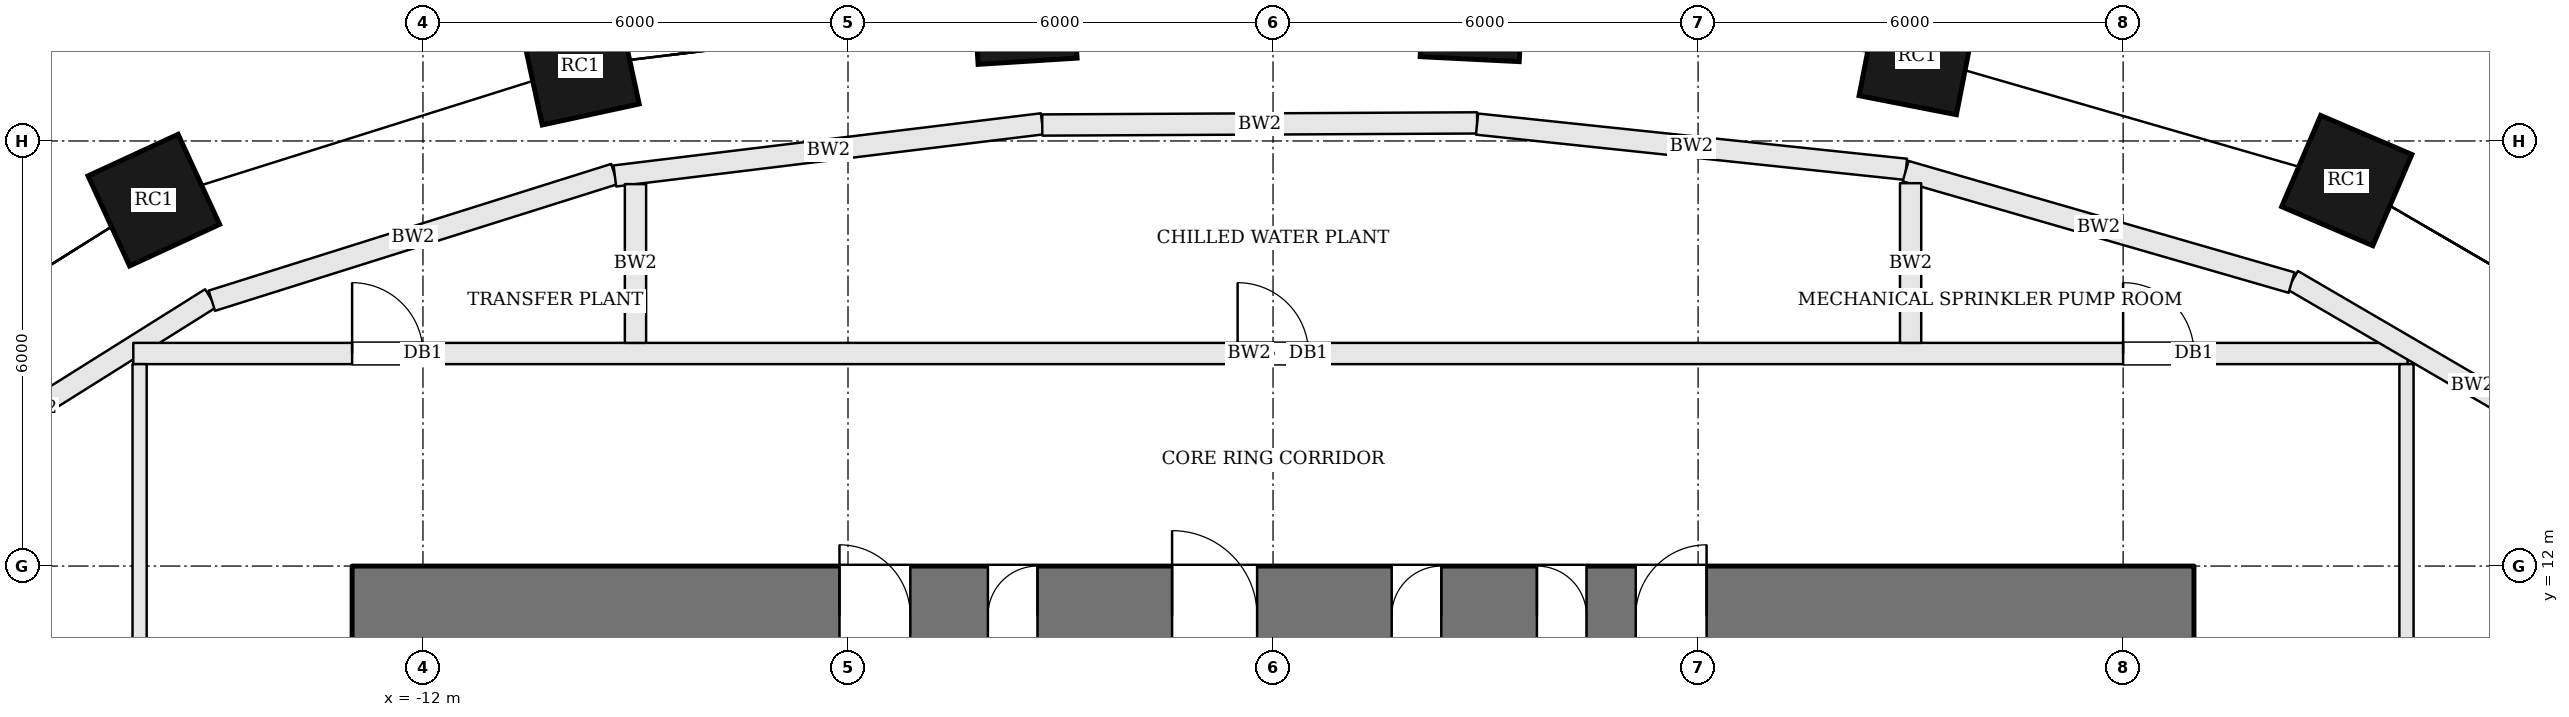
"""IFC4 building model, lengths in metres.
Left out: names, types, materials, properties, quantities, classifications, styles, units other than length and angle.
Written with IfcOpenShell. Run it as: python <this file> out.ifc"""

import sys

from ifc_helpers import new_model, si_unit, direction, frame, frame_2d, origin, origin_2d, place, context, subcontext, project, spatial, rectangle, extrude, element, fill, save


model = new_model("IFC4")
c1 = context("Model", 3, precision=1e-05, world=origin(), true_north=direction((0.0, 1.0)))
c2 = subcontext(c1, "Body", "Model", "MODEL_VIEW")
j1 = project(units=[si_unit("LENGTHUNIT", "METRE"), si_unit("PLANEANGLEUNIT", "RADIAN")], contexts=[c1])
p1 = place(None, origin())
s1 = spatial("IfcSite", under=j1, at=p1, CompositionType="ELEMENT")
p2 = place(p1, origin())
s2 = spatial("IfcBuilding", under=s1, at=p2, CompositionType="ELEMENT")
p3 = place(p2, frame((0.0, 0.0, 33.0)))
s3 = spatial("IfcBuildingStorey", under=s2, at=p3, CompositionType="ELEMENT", Elevation=33.0)
p4 = place(p3, frame((-13.0, 11.3, 0.0), z_axis=(0.0, 0.0, 1.0), x_axis=(1.0, 0.0, 0.0)))
e1 = element("IfcWall", 1, at=p4, inside=s3, PredefinedType="SHEAR", context=c2, shape_type="SweptSolid", body=[
    extrude(rectangle(XDim=26.0, YDim=1.4, at=frame_2d((13.0, 0.0))), origin(), (0.0, 0.0, 1.0), 4.5),
])
p5 = place(p4, frame((8.975, 0.0, 0.0)))
e2 = element("IfcOpeningElement", 2, at=p5, cuts=e1, PredefinedType="OPENING", context=c2, shape_type="SweptSolid", body=[
    extrude(rectangle(XDim=0.7, YDim=2.1, at=frame_2d((0.35, 1.05))), frame((0.0, 0.71, 0.0), z_axis=(0.0, -1.0, 0.0), x_axis=(1.0, 0.0, 0.0)), (0.0, 0.0, 1.0), 1.42),
])
p6 = place(p4, frame((11.575, 0.0, 0.0)))
e3 = element("IfcOpeningElement", 3, at=p6, cuts=e1, PredefinedType="OPENING", context=c2, shape_type="SweptSolid", body=[
    extrude(rectangle(XDim=1.2, YDim=2.1, at=frame_2d((0.6, 1.05))), frame((0.0, 0.71, 0.0), z_axis=(0.0, -1.0, 0.0), x_axis=(1.0, 0.0, 0.0)), (0.0, 0.0, 1.0), 1.42),
])
p7 = place(p4, frame((14.675, 0.0, 0.0)))
e4 = element("IfcOpeningElement", 4, at=p7, cuts=e1, PredefinedType="OPENING", context=c2, shape_type="SweptSolid", body=[
    extrude(rectangle(XDim=0.7, YDim=2.1, at=frame_2d((0.35, 1.05))), frame((0.0, 0.71, 0.0), z_axis=(0.0, -1.0, 0.0), x_axis=(1.0, 0.0, 0.0)), (0.0, 0.0, 1.0), 1.42),
])
p8 = place(p4, frame((16.725, 0.0, 0.0)))
e5 = element("IfcOpeningElement", 5, at=p8, cuts=e1, PredefinedType="OPENING", context=c2, shape_type="SweptSolid", body=[
    extrude(rectangle(XDim=0.7, YDim=2.1, at=frame_2d((0.35, 1.05))), frame((0.0, 0.71, 0.0), z_axis=(0.0, -1.0, 0.0), x_axis=(1.0, 0.0, 0.0)), (0.0, 0.0, 1.0), 1.42),
])
p9 = place(p4, frame((6.88, 0.0, 0.0)))
e6 = element("IfcOpeningElement", 6, at=p9, cuts=e1, PredefinedType="OPENING", context=c2, shape_type="SweptSolid", body=[
    extrude(rectangle(XDim=1.0, YDim=2.1, at=frame_2d((0.5, 1.05))), frame((0.0, 0.71, 0.0), z_axis=(0.0, -1.0, 0.0), x_axis=(1.0, 0.0, 0.0)), (0.0, 0.0, 1.0), 1.42),
])
p10 = place(p4, frame((18.12, 0.0, 0.0)))
e7 = element("IfcOpeningElement", 7, at=p10, cuts=e1, PredefinedType="OPENING", context=c2, shape_type="SweptSolid", body=[
    extrude(rectangle(XDim=1.0, YDim=2.1, at=frame_2d((0.5, 1.05))), frame((0.0, 0.71, 0.0), z_axis=(0.0, -1.0, 0.0), x_axis=(1.0, 0.0, 0.0)), (0.0, 0.0, 1.0), 1.42),
])
for number, where, z_axis, x_axis in (
    (8, (15.157, 17.441, 0.0), (0.0, 0.0, 1.0), (-0.919, 0.394, 0.0)),
    (9, (9.094, 19.192, 0.0), (0.0, 0.0, 1.0), (-0.981, 0.192, 0.0)),
    (10, (2.811, 19.854, 0.0), (0.0, 0.0, 1.0), (-0.999, 0.05, 0.0)),
    (11, (-3.509, 19.824, 0.0), (0.0, 0.0, 1.0), (-0.998, -0.063, 0.0)),
    (12, (-9.78, 19.058, 0.0), (0.0, 0.0, 1.0), (-0.977, -0.211, 0.0)),
    (13, (-15.799, 17.165, 0.0), (0.0, 0.0, 1.0), (-0.908, -0.419, 0.0)),
):
    element("IfcColumn", number, at=place(p3, frame(where, z_axis=z_axis, x_axis=x_axis)), inside=s3, PredefinedType="COLUMN", context=c2, shape_type="SweptSolid", body=[
        extrude(rectangle(XDim=1.4, YDim=1.4, at=origin_2d()), origin(), (0.0, 0.0, 1.0), 4.5),
    ])
p11 = place(p3, frame((18.934, 18.821, 0.0), z_axis=(0.0, 0.0, 1.0), x_axis=(-0.912571415594, 0.408917365052, 0.0)))
e14 = element("IfcWall", 14, at=p11, inside=s3, PredefinedType="SOLIDWALL", context=c2, shape_type="SweptSolid", body=[
    extrude(rectangle(XDim=4.301, YDim=0.45, at=frame_2d((2.15, 0.0))), origin(), (0.0, 0.0, 1.0), 4.3),
])
p12 = place(p11, frame((1.101, 0.0, 1.2)))
e15 = element("IfcOpeningElement", 15, at=p12, cuts=e14, PredefinedType="OPENING", context=c2, shape_type="SweptSolid", body=[
    extrude(rectangle(XDim=2.1, YDim=1.8, at=frame_2d((1.05, 0.9))), frame((0.0, 0.235, 0.0), z_axis=(0.0, -1.0, 0.0), x_axis=(1.0, 0.0, 0.0)), (0.0, 0.0, 1.0), 0.47),
])
p13 = place(p3, frame((-15.009, 20.58, 0.0), z_axis=(0.0, 0.0, 1.0), x_axis=(-0.912571415594, -0.408917365052, 0.0)))
e16 = element("IfcWall", 16, at=p13, inside=s3, PredefinedType="SOLIDWALL", context=c2, shape_type="SweptSolid", body=[
    extrude(rectangle(XDim=4.301, YDim=0.45, at=frame_2d((2.15, 0.0))), origin(), (0.0, 0.0, 1.0), 4.3),
])
p14 = place(p13, frame((1.101, 0.0, 1.2)))
e17 = element("IfcOpeningElement", 17, at=p14, cuts=e16, PredefinedType="OPENING", context=c2, shape_type="SweptSolid", body=[
    extrude(rectangle(XDim=2.1, YDim=1.8, at=frame_2d((1.05, 0.9))), frame((0.0, 0.235, 0.0), z_axis=(0.0, -1.0, 0.0), x_axis=(1.0, 0.0, 0.0)), (0.0, 0.0, 1.0), 0.47),
])
p15 = place(p3, frame((-19.962, 12.664, 0.0), z_axis=(0.0, 0.0, 1.0), x_axis=(0.847051762776, 0.531510405522, 0.0)))
e18 = element("IfcWall", 18, at=p15, inside=s3, PredefinedType="SOLIDWALL", context=c2, shape_type="SweptSolid", body=[
    extrude(rectangle(XDim=5.863, YDim=0.3, at=frame_2d((2.931, 0.0))), origin(), (0.0, 0.0, 1.0), 4.3),
])
p16 = place(p3, frame((-16.089, 15.0, 0.0), z_axis=(0.0, 0.0, 1.0), x_axis=(1.0, 0.0, 0.0)))
e19 = element("IfcWall", 19, at=p16, inside=s3, PredefinedType="SOLIDWALL", context=c2, shape_type="SweptSolid", body=[
    extrude(rectangle(XDim=32.105, YDim=0.3, at=frame_2d((16.053, 0.0))), origin(), (0.0, 0.0, 1.0), 4.3),
])
p17 = place(p16, frame((3.089, 0.0, 0.0)))
e20 = element("IfcOpeningElement", 20, at=p17, cuts=e19, PredefinedType="OPENING", context=c2, shape_type="SweptSolid", body=[
    extrude(rectangle(XDim=1.0, YDim=2.1, at=frame_2d((0.5, 1.05))), frame((0.0, 0.16, 0.0), z_axis=(0.0, -1.0, 0.0), x_axis=(1.0, 0.0, 0.0)), (0.0, 0.0, 1.0), 0.32),
])
p18 = place(p16, frame((15.589, 0.0, 0.0)))
e21 = element("IfcOpeningElement", 21, at=p18, cuts=e19, PredefinedType="OPENING", context=c2, shape_type="SweptSolid", body=[
    extrude(rectangle(XDim=1.0, YDim=2.1, at=frame_2d((0.5, 1.05))), frame((0.0, 0.16, 0.0), z_axis=(0.0, -1.0, 0.0), x_axis=(1.0, 0.0, 0.0)), (0.0, 0.0, 1.0), 0.32),
])
p19 = place(p16, frame((28.089, 0.0, 0.0)))
e22 = element("IfcOpeningElement", 22, at=p19, cuts=e19, PredefinedType="OPENING", context=c2, shape_type="SweptSolid", body=[
    extrude(rectangle(XDim=1.0, YDim=2.1, at=frame_2d((0.5, 1.05))), frame((0.0, 0.16, 0.0), z_axis=(0.0, -1.0, 0.0), x_axis=(1.0, 0.0, 0.0)), (0.0, 0.0, 1.0), 0.32),
])
p20 = place(p3, frame((-16.0, 14.85, 0.0), z_axis=(0.0, 0.0, 1.0), x_axis=(0.0, -1.0, 0.0)))
e23 = element("IfcWall", 23, at=p20, inside=s3, PredefinedType="PARTITIONING", context=c2, shape_type="SweptSolid", body=[
    extrude(rectangle(XDim=20.95, YDim=0.2, at=frame_2d((10.475, 0.0))), origin(), (0.0, 0.0, 1.0), 4.3),
])
p21 = place(p20, frame((9.45, 0.0, 0.0)))
e24 = element("IfcOpeningElement", 24, at=p21, cuts=e23, PredefinedType="OPENING", context=c2, shape_type="SweptSolid", body=[
    extrude(rectangle(XDim=1.8, YDim=2.1, at=frame_2d((0.9, 1.05))), frame((0.0, 0.11, 0.0), z_axis=(0.0, -1.0, 0.0), x_axis=(1.0, 0.0, 0.0)), (0.0, 0.0, 1.0), 0.22),
])
p22 = place(p3, frame((16.0, -5.9, 0.0), z_axis=(0.0, 0.0, 1.0), x_axis=(0.0, 1.0, 0.0)))
e25 = element("IfcWall", 25, at=p22, inside=s3, PredefinedType="PARTITIONING", context=c2, shape_type="SweptSolid", body=[
    extrude(rectangle(XDim=20.75, YDim=0.2, at=frame_2d((10.375, 0.0))), origin(), (0.0, 0.0, 1.0), 4.3),
])
p23 = place(p22, frame((9.5, 0.0, 0.0)))
e26 = element("IfcOpeningElement", 26, at=p23, cuts=e25, PredefinedType="OPENING", context=c2, shape_type="SweptSolid", body=[
    extrude(rectangle(XDim=1.8, YDim=2.1, at=frame_2d((0.9, 1.05))), frame((0.0, 0.11, 0.0), z_axis=(0.0, -1.0, 0.0), x_axis=(1.0, 0.0, 0.0)), (0.0, 0.0, 1.0), 0.22),
])
p24 = place(p3, frame((14.392, 16.035, 0.0), z_axis=(0.0, 0.0, 1.0), x_axis=(0.863774384703, -0.503878767493, 0.0)))
e27 = element("IfcWall", 27, at=p24, inside=s3, PredefinedType="SOLIDWALL", context=c2, shape_type="SweptSolid", body=[
    extrude(rectangle(XDim=5.882, YDim=0.3, at=frame_2d((2.941, 0.0))), origin(), (0.0, 0.0, 1.0), 4.3),
])
p25 = place(p3, frame((-14.98, 15.745, 0.0), z_axis=(0.0, 0.0, 1.0), x_axis=(0.953907270772, 0.300101514107, 0.0)))
e28 = element("IfcWall", 28, at=p25, inside=s3, PredefinedType="SOLIDWALL", context=c2, shape_type="SweptSolid", body=[
    extrude(rectangle(XDim=5.958, YDim=0.3, at=frame_2d((2.979, 0.0))), origin(), (0.0, 0.0, 1.0), 4.3),
])
p26 = place(p3, frame((-9.291, 17.506, 0.0), z_axis=(0.0, 0.0, 1.0), x_axis=(0.992641284561, 0.12109203188, 0.0)))
e29 = element("IfcWall", 29, at=p26, inside=s3, PredefinedType="SOLIDWALL", context=c2, shape_type="SweptSolid", body=[
    extrude(rectangle(XDim=6.077, YDim=0.3, at=frame_2d((3.038, 0.0))), origin(), (0.0, 0.0, 1.0), 4.3),
])
p27 = place(p3, frame((-9.0, 17.391, 0.0), z_axis=(0.0, 0.0, 1.0), x_axis=(0.0, -1.0, 0.0)))
e30 = element("IfcWall", 30, at=p27, inside=s3, PredefinedType="SOLIDWALL", context=c2, shape_type="SweptSolid", body=[
    extrude(rectangle(XDim=2.241, YDim=0.3, at=frame_2d((1.121, 0.0))), origin(), (0.0, 0.0, 1.0), 4.3),
])
p28 = place(p3, frame((-3.258, 18.225, 0.0), z_axis=(0.0, 0.0, 1.0), x_axis=(0.999988230875, 0.004851609169, 0.0)))
e31 = element("IfcWall", 31, at=p28, inside=s3, PredefinedType="SOLIDWALL", context=c2, shape_type="SweptSolid", body=[
    extrude(rectangle(XDim=6.139, YDim=0.3, at=frame_2d((3.07, 0.0))), origin(), (0.0, 0.0, 1.0), 4.3),
])
p29 = place(p3, frame((2.88, 18.238, 0.0), z_axis=(0.0, 0.0, 1.0), x_axis=(0.994496001262, -0.10477453638, 0.0)))
e32 = element("IfcWall", 32, at=p29, inside=s3, PredefinedType="SOLIDWALL", context=c2, shape_type="SweptSolid", body=[
    extrude(rectangle(XDim=6.089, YDim=0.3, at=frame_2d((3.044, 0.0))), origin(), (0.0, 0.0, 1.0), 4.3),
])
p30 = place(p3, frame((8.93, 17.574, 0.0), z_axis=(0.0, 0.0, 1.0), x_axis=(0.960754989582, -0.277398359752, 0.0)))
e33 = element("IfcWall", 33, at=p30, inside=s3, PredefinedType="SOLIDWALL", context=c2, shape_type="SweptSolid", body=[
    extrude(rectangle(XDim=5.671, YDim=0.3, at=frame_2d((2.835, 0.0))), origin(), (0.0, 0.0, 1.0), 4.3),
])
p31 = place(p3, frame((9.0, 17.404, 0.0), z_axis=(0.0, 0.0, 1.0), x_axis=(0.0, -1.0, 0.0)))
e34 = element("IfcWall", 34, at=p31, inside=s3, PredefinedType="SOLIDWALL", context=c2, shape_type="SweptSolid", body=[
    extrude(rectangle(XDim=2.254, YDim=0.3, at=frame_2d((1.127, 0.0))), origin(), (0.0, 0.0, 1.0), 4.3),
])
p32 = place(p12, origin())
e35 = element("IfcWindow", 35, at=p32, inside=s3, PartitioningType="SINGLE_PANEL", PredefinedType="WINDOW", context=c2, shape_type="SweptSolid", body=[
    extrude(rectangle(XDim=2.1, YDim=1.8, at=frame_2d((1.05, 0.9))), frame((0.0, 0.135, 0.0), z_axis=(0.0, -1.0, 0.0), x_axis=(1.0, 0.0, 0.0)), (0.0, 0.0, 1.0), 0.06),
])
fill(e15, e35)
p33 = place(p14, origin())
e36 = element("IfcWindow", 36, at=p33, inside=s3, PartitioningType="SINGLE_PANEL", PredefinedType="WINDOW", context=c2, shape_type="SweptSolid", body=[
    extrude(rectangle(XDim=2.1, YDim=1.8, at=frame_2d((1.05, 0.9))), frame((0.0, 0.135, 0.0), z_axis=(0.0, -1.0, 0.0), x_axis=(1.0, 0.0, 0.0)), (0.0, 0.0, 1.0), 0.06),
])
fill(e17, e36)
p34 = place(p5, origin())
e37 = element("IfcDoor", 37, at=p34, inside=s3, OperationType="SINGLE_SWING_RIGHT", PredefinedType="DOOR", context=c2, shape_type="SweptSolid", body=[
    extrude(rectangle(XDim=0.7, YDim=2.1, at=frame_2d((0.35, 1.05))), frame((0.0, 0.025, 0.0), z_axis=(0.0, -1.0, 0.0), x_axis=(1.0, 0.0, 0.0)), (0.0, 0.0, 1.0), 0.05),
])
fill(e2, e37)
p35 = place(p6, origin())
e38 = element("IfcDoor", 38, at=p35, inside=s3, OperationType="SINGLE_SWING_LEFT", PredefinedType="DOOR", context=c2, shape_type="SweptSolid", body=[
    extrude(rectangle(XDim=1.2, YDim=2.1, at=frame_2d((0.6, 1.05))), frame((0.0, 0.025, 0.0), z_axis=(0.0, -1.0, 0.0), x_axis=(1.0, 0.0, 0.0)), (0.0, 0.0, 1.0), 0.05),
])
fill(e3, e38)
p36 = place(p7, origin())
e39 = element("IfcDoor", 39, at=p36, inside=s3, OperationType="SINGLE_SWING_RIGHT", PredefinedType="DOOR", context=c2, shape_type="SweptSolid", body=[
    extrude(rectangle(XDim=0.7, YDim=2.1, at=frame_2d((0.35, 1.05))), frame((0.0, 0.025, 0.0), z_axis=(0.0, -1.0, 0.0), x_axis=(1.0, 0.0, 0.0)), (0.0, 0.0, 1.0), 0.05),
])
fill(e4, e39)
p37 = place(p8, origin())
e40 = element("IfcDoor", 40, at=p37, inside=s3, OperationType="SINGLE_SWING_LEFT", PredefinedType="DOOR", context=c2, shape_type="SweptSolid", body=[
    extrude(rectangle(XDim=0.7, YDim=2.1, at=frame_2d((0.35, 1.05))), frame((0.0, 0.025, 0.0), z_axis=(0.0, -1.0, 0.0), x_axis=(1.0, 0.0, 0.0)), (0.0, 0.0, 1.0), 0.05),
])
fill(e5, e40)
p38 = place(p9, origin())
e41 = element("IfcDoor", 41, at=p38, inside=s3, OperationType="SINGLE_SWING_LEFT", PredefinedType="DOOR", context=c2, shape_type="SweptSolid", body=[
    extrude(rectangle(XDim=1.0, YDim=2.1, at=frame_2d((0.5, 1.05))), frame((0.0, 0.025, 0.0), z_axis=(0.0, -1.0, 0.0), x_axis=(1.0, 0.0, 0.0)), (0.0, 0.0, 1.0), 0.05),
])
fill(e6, e41)
p39 = place(p10, origin())
e42 = element("IfcDoor", 42, at=p39, inside=s3, OperationType="SINGLE_SWING_RIGHT", PredefinedType="DOOR", context=c2, shape_type="SweptSolid", body=[
    extrude(rectangle(XDim=1.0, YDim=2.1, at=frame_2d((0.5, 1.05))), frame((0.0, 0.025, 0.0), z_axis=(0.0, -1.0, 0.0), x_axis=(1.0, 0.0, 0.0)), (0.0, 0.0, 1.0), 0.05),
])
fill(e7, e42)
p40 = place(p17, origin())
e43 = element("IfcDoor", 43, at=p40, inside=s3, OperationType="SINGLE_SWING_LEFT", PredefinedType="DOOR", context=c2, shape_type="SweptSolid", body=[
    extrude(rectangle(XDim=1.0, YDim=2.1, at=frame_2d((0.5, 1.05))), frame((0.0, 0.025, 0.0), z_axis=(0.0, -1.0, 0.0), x_axis=(1.0, 0.0, 0.0)), (0.0, 0.0, 1.0), 0.05),
])
fill(e20, e43)
p41 = place(p18, origin())
e44 = element("IfcDoor", 44, at=p41, inside=s3, OperationType="SINGLE_SWING_LEFT", PredefinedType="DOOR", context=c2, shape_type="SweptSolid", body=[
    extrude(rectangle(XDim=1.0, YDim=2.1, at=frame_2d((0.5, 1.05))), frame((0.0, 0.025, 0.0), z_axis=(0.0, -1.0, 0.0), x_axis=(1.0, 0.0, 0.0)), (0.0, 0.0, 1.0), 0.05),
])
fill(e21, e44)
p42 = place(p19, origin())
e45 = element("IfcDoor", 45, at=p42, inside=s3, OperationType="SINGLE_SWING_LEFT", PredefinedType="DOOR", context=c2, shape_type="SweptSolid", body=[
    extrude(rectangle(XDim=1.0, YDim=2.1, at=frame_2d((0.5, 1.05))), frame((0.0, 0.025, 0.0), z_axis=(0.0, -1.0, 0.0), x_axis=(1.0, 0.0, 0.0)), (0.0, 0.0, 1.0), 0.05),
])
fill(e22, e45)
save(model, sys.argv[1])
